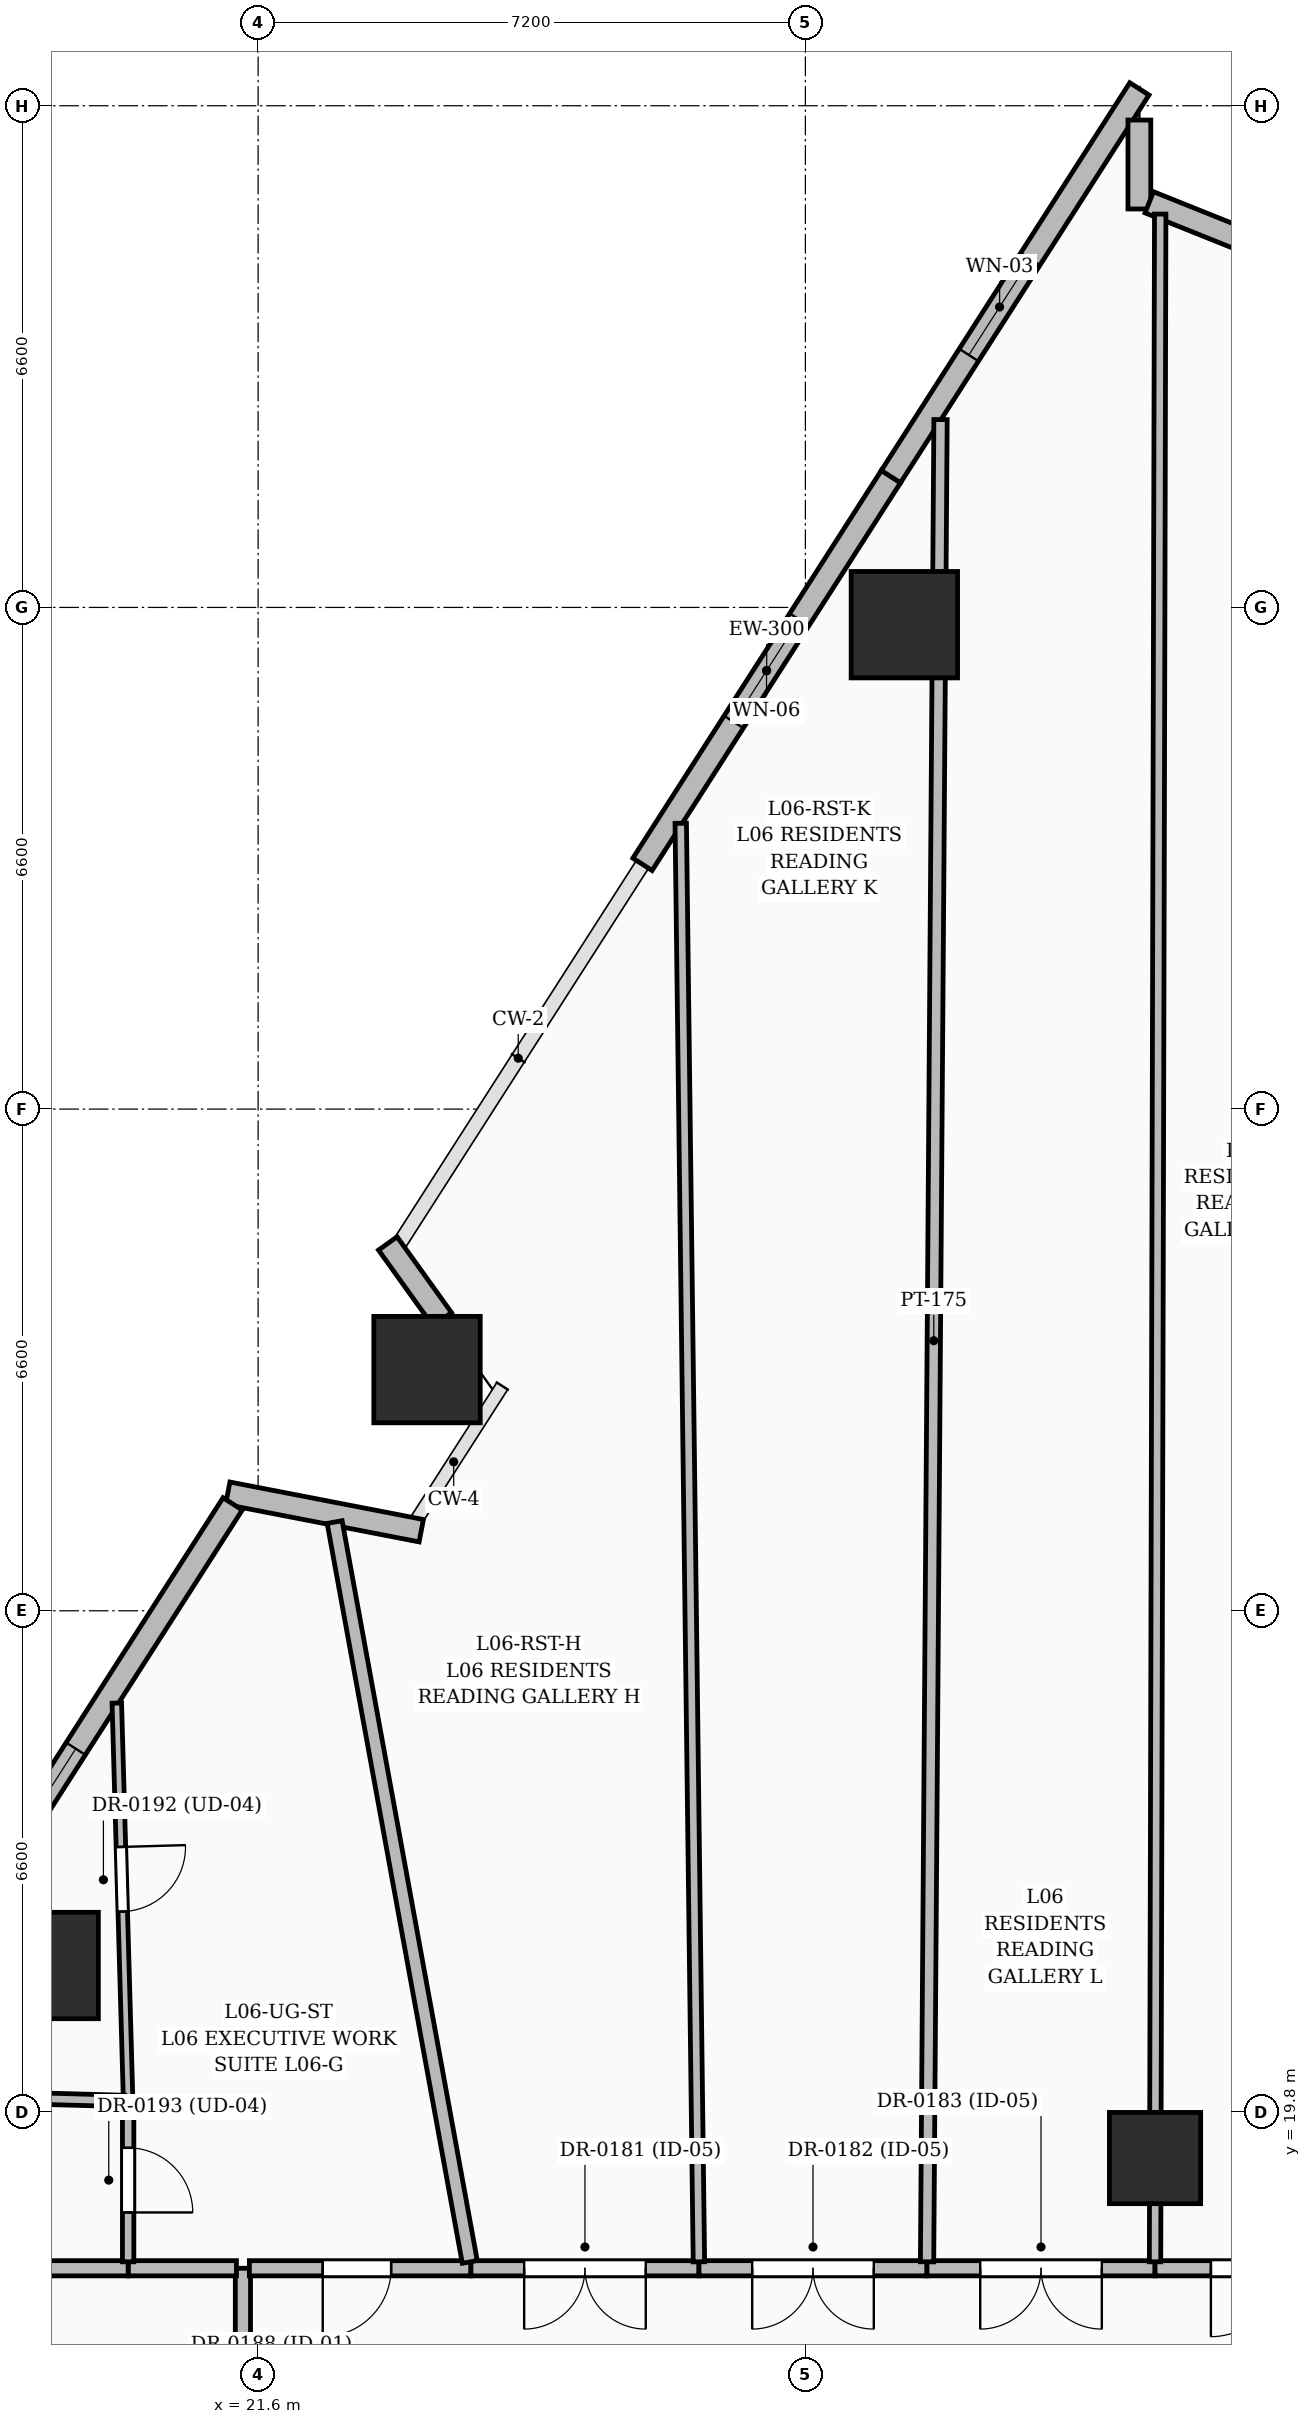
"""IFC4 building model, lengths in metres.
Left out: names, types, materials, properties, quantities, classifications, styles, units other than length and angle.
Written with IfcOpenShell. Run it as: python <this file> out.ifc"""

import sys

from ifc_helpers import new_model, si_unit, direction, frame, frame_2d, origin, origin_2d, place, context, subcontext, project, spatial, rectangle, extrude, element, fill, save


model = new_model("IFC4")
c1 = context("Model", 3, precision=1e-05, world=origin(), true_north=direction((0.0, 1.0)))
c2 = subcontext(c1, "Body", "Model", "MODEL_VIEW")
j1 = project(units=[si_unit("LENGTHUNIT", "METRE"), si_unit("PLANEANGLEUNIT", "RADIAN")], contexts=[c1])
p1 = place(None, origin())
s1 = spatial("IfcSite", under=j1, at=p1, CompositionType="ELEMENT")
p2 = place(p1, origin())
s2 = spatial("IfcBuilding", under=s1, at=p2, CompositionType="ELEMENT")
p3 = place(p2, frame((0.0, 0.0, 31.8)))
s3 = spatial("IfcBuildingStorey", under=s2, at=p3, CompositionType="ELEMENT", Elevation=31.8)
p4 = place(p3, frame((33.4, 19.2, 0.0), z_axis=(0.0, 0.0, 1.0), x_axis=(1.0, 0.0, 0.0)))
e1 = element("IfcColumn", 1, at=p4, inside=s3, PredefinedType="COLUMN", context=c2, shape_type="SweptSolid", body=[
    extrude(rectangle(XDim=1.2, YDim=1.2, at=origin_2d()), origin(), (0.0, 0.0, 1.0), 3.6),
])
for number, where, z_axis, x_axis in (
    (2, (30.102, 39.373, 0.0), (0.0, 0.0, 1.0), (1.0, 0.0, 0.0)),
    (3, (23.822, 29.573, 0.0), (0.0, 0.0, 1.0), (1.0, 0.0, 0.0)),
    (4, (18.798, 21.733, 0.0), (0.0, 0.0, 1.0), (1.0, 0.0, 0.0)),
):
    element("IfcColumn", number, at=place(p3, frame(where, z_axis=z_axis, x_axis=x_axis)), inside=s3, PredefinedType="COLUMN", context=c2, shape_type="SweptSolid", body=[
        extrude(rectangle(XDim=1.4, YDim=1.4, at=origin_2d()), origin(), (0.0, 0.0, 1.0), 3.6),
    ])
p5 = place(p3, frame((21.201, 27.947, 0.0), z_axis=(0.0, 0.0, 1.0), x_axis=(0.981746971615, -0.190191702567, 0.0)))
e5 = element("IfcWall", 5, at=p5, inside=s3, PredefinedType="SOLIDWALL", context=c2, shape_type="SweptSolid", body=[
    extrude(rectangle(XDim=2.593, YDim=0.3, at=frame_2d((1.296, 0.0))), origin(), (0.0, 0.0, 1.0), 2.375),
])
p6 = place(p3, frame((24.022, 30.235, 0.0), z_axis=(0.0, 0.0, 1.0), x_axis=(-0.583004903736, 0.812468634607, 0.0)))
e6 = element("IfcWall", 6, at=p6, inside=s3, PredefinedType="SOLIDWALL", context=c2, shape_type="SweptSolid", body=[
    extrude(rectangle(XDim=1.228, YDim=0.3, at=frame_2d((0.614, 0.0))), origin(), (0.0, 0.0, 1.0), 2.375),
])
p7 = place(p3, frame((26.657, 36.22, 0.0), z_axis=(0.0, 0.0, 1.0), x_axis=(0.539506453767, 0.841981464371, 0.0)))
e7 = element("IfcWall", 7, at=p7, inside=s3, PredefinedType="SOLIDWALL", context=c2, shape_type="SweptSolid", body=[
    extrude(rectangle(XDim=6.058, YDim=0.3, at=frame_2d((3.029, 0.0))), origin(), (0.0, 0.0, 1.0), 3.35),
])
p8 = place(p7, frame((2.225, 0.0, 0.55)))
e8 = element("IfcOpeningElement", 8, at=p8, cuts=e7, PredefinedType="OPENING", context=c2, shape_type="SweptSolid", body=[
    extrude(rectangle(XDim=1.6, YDim=2.2, at=frame_2d((0.8, 1.1))), frame((0.0, 0.16, 0.0), z_axis=(0.0, -1.0, 0.0), x_axis=(1.0, 0.0, 0.0)), (0.0, 0.0, 1.0), 0.32),
])
p9 = place(p3, frame((29.925, 41.321, 0.0), z_axis=(0.0, 0.0, 1.0), x_axis=(0.53953502124, 0.841963158847, 0.0)))
e9 = element("IfcWall", 9, at=p9, inside=s3, PredefinedType="SOLIDWALL", context=c2, shape_type="SweptSolid", body=[
    extrude(rectangle(XDim=6.059, YDim=0.3, at=frame_2d((3.029, 0.0))), origin(), (0.0, 0.0, 1.0), 3.35),
])
p10 = place(p9, frame((1.9, 0.0, 0.6)))
e10 = element("IfcOpeningElement", 10, at=p10, cuts=e9, PredefinedType="OPENING", context=c2, shape_type="SweptSolid", body=[
    extrude(rectangle(XDim=1.5, YDim=2.1, at=frame_2d((0.75, 1.05))), frame((0.0, 0.16, 0.0), z_axis=(0.0, -1.0, 0.0), x_axis=(1.0, 0.0, 0.0)), (0.0, 0.0, 1.0), 0.32),
])
p11 = place(p3, frame((33.194, 46.012, 0.0), z_axis=(0.0, 0.0, 1.0), x_axis=(0.0, -1.0, 0.0)))
e11 = element("IfcWall", 11, at=p11, inside=s3, PredefinedType="SOLIDWALL", context=c2, shape_type="SweptSolid", body=[
    extrude(rectangle(XDim=1.17, YDim=0.3, at=frame_2d((0.585, 0.0))), origin(), (0.0, 0.0, 1.0), 3.35),
])
p12 = place(p3, frame((33.324, 44.93, 0.0), z_axis=(0.0, 0.0, 1.0), x_axis=(0.928091921944, -0.372351157407, 0.0)))
e12 = element("IfcWall", 12, at=p12, inside=s3, PredefinedType="SOLIDWALL", context=c2, shape_type="SweptSolid", body=[
    extrude(rectangle(XDim=3.023, YDim=0.3, at=frame_2d((1.512, 0.0))), origin(), (0.0, 0.0, 1.0), 3.35),
])
p13 = place(p3, frame((17.893, 22.543, 0.0), z_axis=(0.0, 0.0, 1.0), x_axis=(0.539539053693, 0.841960574813, 0.0)))
e13 = element("IfcWall", 13, at=p13, inside=s3, PredefinedType="SOLIDWALL", context=c2, shape_type="SweptSolid", body=[
    extrude(rectangle(XDim=6.251, YDim=0.3, at=frame_2d((3.125, 0.0))), origin(), (0.0, 0.0, 1.0), 3.35),
])
p14 = place(p13, frame((0.625, 0.0, 0.6)))
e14 = element("IfcOpeningElement", 14, at=p14, cuts=e13, PredefinedType="OPENING", context=c2, shape_type="SweptSolid", body=[
    extrude(rectangle(XDim=1.8, YDim=2.1, at=frame_2d((0.9, 1.05))), frame((0.0, 0.16, 0.0), z_axis=(0.0, -1.0, 0.0), x_axis=(1.0, 0.0, 0.0)), (0.0, 0.0, 1.0), 0.32),
])
p15 = place(p3, frame((21.4, 17.75, 0.0), z_axis=(0.0, 0.0, 1.0), x_axis=(0.0, -1.0, 0.0)))
e15 = element("IfcWall", 15, at=p15, inside=s3, PredefinedType="PARTITIONING", context=c2, shape_type="SweptSolid", body=[
    extrude(rectangle(XDim=4.17, YDim=0.2, at=frame_2d((2.085, 0.0))), origin(), (0.0, 0.0, 1.0), 2.709),
])
p16 = place(p15, frame((1.643, 0.0, 0.0)))
e16 = element("IfcOpeningElement", 16, at=p16, cuts=e15, PredefinedType="OPENING", context=c2, shape_type="SweptSolid", body=[
    extrude(rectangle(XDim=1.0, YDim=2.2, at=frame_2d((0.5, 1.1))), frame((0.0, 0.11, 0.0), z_axis=(0.0, -1.0, 0.0), x_axis=(1.0, 0.0, 0.0)), (0.0, 0.0, 1.0), 0.22),
])
p17 = place(p3, frame((24.4, 17.75, 0.0), z_axis=(0.0, 0.0, 1.0), x_axis=(-1.0, 0.0, 0.0)))
e17 = element("IfcWall", 17, at=p17, inside=s3, PredefinedType="PARTITIONING", context=c2, shape_type="SweptSolid", body=[
    extrude(rectangle(XDim=2.915, YDim=0.2, at=frame_2d((1.458, 0.0))), origin(), (0.0, 0.0, 1.0), 2.228),
])
p18 = place(p17, frame((1.05, 0.0, 0.0)))
e18 = element("IfcOpeningElement", 18, at=p18, cuts=e17, PredefinedType="OPENING", context=c2, shape_type="SweptSolid", body=[
    extrude(rectangle(XDim=0.9, YDim=2.1, at=frame_2d((0.45, 1.05))), frame((0.0, 0.11, 0.0), z_axis=(0.0, -1.0, 0.0), x_axis=(1.0, 0.0, 0.0)), (0.0, 0.0, 1.0), 0.22),
])
p19 = place(p3, frame((27.4, 17.75, 0.0), z_axis=(0.0, 0.0, 1.0), x_axis=(-1.0, 0.0, 0.0)))
e19 = element("IfcWall", 19, at=p19, inside=s3, PredefinedType="PARTITIONING", context=c2, shape_type="SweptSolid", body=[
    extrude(rectangle(XDim=3.0, YDim=0.2, at=frame_2d((1.5, 0.0))), origin(), (0.0, 0.0, 1.0), 2.709),
])
p20 = place(p19, frame((0.7, 0.0, 0.0)))
e20 = element("IfcOpeningElement", 20, at=p20, cuts=e19, PredefinedType="OPENING", context=c2, shape_type="SweptSolid", body=[
    extrude(rectangle(XDim=1.6, YDim=2.3, at=frame_2d((0.8, 1.15))), frame((0.0, 0.11, 0.0), z_axis=(0.0, -1.0, 0.0), x_axis=(1.0, 0.0, 0.0)), (0.0, 0.0, 1.0), 0.22),
])
p21 = place(p3, frame((30.4, 17.75, 0.0), z_axis=(0.0, 0.0, 1.0), x_axis=(-1.0, 0.0, 0.0)))
e21 = element("IfcWall", 21, at=p21, inside=s3, PredefinedType="PARTITIONING", context=c2, shape_type="SweptSolid", body=[
    extrude(rectangle(XDim=3.0, YDim=0.2, at=frame_2d((1.5, 0.0))), origin(), (0.0, 0.0, 1.0), 3.35),
])
p22 = place(p21, frame((0.7, 0.0, 0.0)))
e22 = element("IfcOpeningElement", 22, at=p22, cuts=e21, PredefinedType="OPENING", context=c2, shape_type="SweptSolid", body=[
    extrude(rectangle(XDim=1.6, YDim=2.3, at=frame_2d((0.8, 1.15))), frame((0.0, 0.11, 0.0), z_axis=(0.0, -1.0, 0.0), x_axis=(1.0, 0.0, 0.0)), (0.0, 0.0, 1.0), 0.22),
])
p23 = place(p3, frame((33.4, 17.75, 0.0), z_axis=(0.0, 0.0, 1.0), x_axis=(-1.0, 0.0, 0.0)))
e23 = element("IfcWall", 23, at=p23, inside=s3, PredefinedType="PARTITIONING", context=c2, shape_type="SweptSolid", body=[
    extrude(rectangle(XDim=3.0, YDim=0.2, at=frame_2d((1.5, 0.0))), origin(), (0.0, 0.0, 1.0), 3.35),
])
p24 = place(p23, frame((0.7, 0.0, 0.0)))
e24 = element("IfcOpeningElement", 24, at=p24, cuts=e23, PredefinedType="OPENING", context=c2, shape_type="SweptSolid", body=[
    extrude(rectangle(XDim=1.6, YDim=2.3, at=frame_2d((0.8, 1.15))), frame((0.0, 0.11, 0.0), z_axis=(0.0, -1.0, 0.0), x_axis=(1.0, 0.0, 0.0)), (0.0, 0.0, 1.0), 0.22),
])
p25 = place(p3, frame((35.77, 17.75, 0.0), z_axis=(0.0, 0.0, 1.0), x_axis=(-1.0, 0.0, 0.0)))
e25 = element("IfcWall", 25, at=p25, inside=s3, PredefinedType="PARTITIONING", context=c2, shape_type="SweptSolid", body=[
    extrude(rectangle(XDim=2.37, YDim=0.2, at=frame_2d((1.185, 0.0))), origin(), (0.0, 0.0, 1.0), 2.309),
])
p26 = place(p25, frame((0.735, 0.0, 0.0)))
e26 = element("IfcOpeningElement", 26, at=p26, cuts=e25, PredefinedType="OPENING", context=c2, shape_type="SweptSolid", body=[
    extrude(rectangle(XDim=0.9, YDim=2.1, at=frame_2d((0.45, 1.05))), frame((0.0, 0.11, 0.0), z_axis=(0.0, -1.0, 0.0), x_axis=(1.0, 0.0, 0.0)), (0.0, 0.0, 1.0), 0.22),
])
p27 = place(p3, frame((21.315, 17.75, 0.0), z_axis=(0.0, 0.0, 1.0), x_axis=(-1.0, 0.0, 0.0)))
e27 = element("IfcWall", 27, at=p27, inside=s3, PredefinedType="PARTITIONING", context=c2, shape_type="SweptSolid", body=[
    extrude(rectangle(XDim=1.425, YDim=0.2, at=frame_2d((0.712, 0.0))), origin(), (0.0, 0.0, 1.0), 2.709),
])
p28 = place(p3, frame((19.89, 17.75, 0.0), z_axis=(0.0, 0.0, 1.0), x_axis=(-1.0, 0.0, 0.0)))
e28 = element("IfcWall", 28, at=p28, inside=s3, PredefinedType="PARTITIONING", context=c2, shape_type="SweptSolid", body=[
    extrude(rectangle(XDim=3.202, YDim=0.2, at=frame_2d((1.601, 0.0))), origin(), (0.0, 0.0, 1.0), 3.35),
])
p29 = place(p3, frame((19.741, 25.186, 0.0), z_axis=(0.0, 0.0, 1.0), x_axis=(0.028430709053, -0.999595765689, 0.0)))
e29 = element("IfcWall", 29, at=p29, inside=s3, PredefinedType="PARTITIONING", context=c2, shape_type="SweptSolid", body=[
    extrude(rectangle(XDim=5.238, YDim=0.125, at=frame_2d((2.619, 0.0))), origin(), (0.0, 0.0, 1.0), 2.228),
])
p30 = place(p29, frame((1.894, 0.0, 0.0)))
e30 = element("IfcOpeningElement", 30, at=p30, cuts=e29, PredefinedType="OPENING", context=c2, shape_type="SweptSolid", body=[
    extrude(rectangle(XDim=0.85, YDim=2.1, at=frame_2d((0.425, 1.05))), frame((0.0, 0.072, 0.0), z_axis=(0.0, -1.0, 0.0), x_axis=(1.0, 0.0, 0.0)), (0.0, 0.0, 1.0), 0.145),
])
p31 = place(p3, frame((19.89, 19.95, 0.0), z_axis=(0.0, 0.0, 1.0), x_axis=(0.0, -1.0, 0.0)))
e31 = element("IfcWall", 31, at=p31, inside=s3, PredefinedType="PARTITIONING", context=c2, shape_type="SweptSolid", body=[
    extrude(rectangle(XDim=2.115, YDim=0.15, at=frame_2d((1.058, 0.0))), origin(), (0.0, 0.0, 1.0), 3.35),
])
p32 = place(p31, frame((0.615, 0.0, 0.0)))
e32 = element("IfcOpeningElement", 32, at=p32, cuts=e31, PredefinedType="OPENING", context=c2, shape_type="SweptSolid", body=[
    extrude(rectangle(XDim=0.85, YDim=2.1, at=frame_2d((0.425, 1.05))), frame((0.0, 0.085, 0.0), z_axis=(0.0, -1.0, 0.0), x_axis=(1.0, 0.0, 0.0)), (0.0, 0.0, 1.0), 0.17),
])
p33 = place(p3, frame((24.385, 17.833, 0.0), z_axis=(0.0, 0.0, 1.0), x_axis=(-0.179680097859, 0.98372509495, 0.0)))
e33 = element("IfcWall", 33, at=p33, inside=s3, PredefinedType="PARTITIONING", context=c2, shape_type="SweptSolid", body=[
    extrude(rectangle(XDim=9.895, YDim=0.2, at=frame_2d((4.947, 0.0))), origin(), (0.0, 0.0, 1.0), 2.37),
])
p34 = place(p3, frame((16.433, 20.046, 0.0), z_axis=(0.0, 0.0, 1.0), x_axis=(0.999614255068, -0.027773027638, 0.0)))
e34 = element("IfcWall", 34, at=p34, inside=s3, PredefinedType="PARTITIONING", context=c2, shape_type="SweptSolid", body=[
    extrude(rectangle(XDim=3.411, YDim=0.15, at=frame_2d((1.705, 0.0))), origin(), (0.0, 0.0, 1.0), 2.37),
])
p35 = place(p3, frame((27.399, 17.835, 0.0), z_axis=(0.0, 0.0, 1.0), x_axis=(-0.012641377926, 0.99992009459, 0.0)))
e35 = element("IfcWall", 35, at=p35, inside=s3, PredefinedType="PARTITIONING", context=c2, shape_type="SweptSolid", body=[
    extrude(rectangle(XDim=18.927, YDim=0.15, at=frame_2d((9.463, 0.0))), origin(), (0.0, 0.0, 1.0), 2.228),
])
p36 = place(p3, frame((30.401, 17.835, 0.0), z_axis=(0.0, 0.0, 1.0), x_axis=(0.007313118493, 0.999973258791, 0.0)))
e36 = element("IfcWall", 36, at=p36, inside=s3, PredefinedType="PARTITIONING", context=c2, shape_type="SweptSolid", body=[
    extrude(rectangle(XDim=24.237, YDim=0.175, at=frame_2d((12.118, 0.0))), origin(), (0.0, 0.0, 1.0), 2.228),
])
p37 = place(p3, frame((33.4, 17.835, 0.0), z_axis=(0.0, 0.0, 1.0), x_axis=(0.002519340237, 0.999996826457, 0.0)))
e37 = element("IfcWall", 37, at=p37, inside=s3, PredefinedType="PARTITIONING", context=c2, shape_type="SweptSolid", body=[
    extrude(rectangle(XDim=26.94, YDim=0.15, at=frame_2d((13.47, 0.0))), origin(), (0.0, 0.0, 1.0), 2.228),
])
p38 = place(p8, origin())
e38 = element("IfcWindow", 38, at=p38, inside=s3, PartitioningType="SINGLE_PANEL", PredefinedType="WINDOW", context=c2, shape_type="SweptSolid", body=[
    extrude(rectangle(XDim=1.6, YDim=2.2, at=frame_2d((0.8, 1.1))), frame((0.0, 0.03, 0.0), z_axis=(0.0, -1.0, 0.0), x_axis=(1.0, 0.0, 0.0)), (0.0, 0.0, 1.0), 0.06),
])
fill(e8, e38)
p39 = place(p10, origin())
e39 = element("IfcWindow", 39, at=p39, inside=s3, PartitioningType="SINGLE_PANEL", PredefinedType="WINDOW", context=c2, shape_type="SweptSolid", body=[
    extrude(rectangle(XDim=1.5, YDim=2.1, at=frame_2d((0.75, 1.05))), frame((0.0, 0.03, 0.0), z_axis=(0.0, -1.0, 0.0), x_axis=(1.0, 0.0, 0.0)), (0.0, 0.0, 1.0), 0.06),
])
fill(e10, e39)
p40 = place(p14, origin())
e40 = element("IfcWindow", 40, at=p40, inside=s3, PartitioningType="SINGLE_PANEL", PredefinedType="WINDOW", context=c2, shape_type="SweptSolid", body=[
    extrude(rectangle(XDim=1.8, YDim=2.1, at=frame_2d((0.9, 1.05))), frame((0.0, 0.03, 0.0), z_axis=(0.0, -1.0, 0.0), x_axis=(1.0, 0.0, 0.0)), (0.0, 0.0, 1.0), 0.06),
])
fill(e14, e40)
p41 = place(p20, origin())
e41 = element("IfcDoor", 41, at=p41, inside=s3, OperationType="DOUBLE_DOOR_SINGLE_SWING", PredefinedType="DOOR", context=c2, shape_type="SweptSolid", body=[
    extrude(rectangle(XDim=1.6, YDim=2.3, at=frame_2d((0.8, 1.15))), frame((0.0, 0.025, 0.0), z_axis=(0.0, -1.0, 0.0), x_axis=(1.0, 0.0, 0.0)), (0.0, 0.0, 1.0), 0.05),
])
fill(e20, e41)
p42 = place(p22, origin())
e42 = element("IfcDoor", 42, at=p42, inside=s3, OperationType="DOUBLE_DOOR_SINGLE_SWING", PredefinedType="DOOR", context=c2, shape_type="SweptSolid", body=[
    extrude(rectangle(XDim=1.6, YDim=2.3, at=frame_2d((0.8, 1.15))), frame((0.0, 0.025, 0.0), z_axis=(0.0, -1.0, 0.0), x_axis=(1.0, 0.0, 0.0)), (0.0, 0.0, 1.0), 0.05),
])
fill(e22, e42)
p43 = place(p24, origin())
e43 = element("IfcDoor", 43, at=p43, inside=s3, OperationType="DOUBLE_DOOR_SINGLE_SWING", PredefinedType="DOOR", context=c2, shape_type="SweptSolid", body=[
    extrude(rectangle(XDim=1.6, YDim=2.3, at=frame_2d((0.8, 1.15))), frame((0.0, 0.025, 0.0), z_axis=(0.0, -1.0, 0.0), x_axis=(1.0, 0.0, 0.0)), (0.0, 0.0, 1.0), 0.05),
])
fill(e24, e43)
p44 = place(p26, origin())
e44 = element("IfcDoor", 44, at=p44, inside=s3, OperationType="SINGLE_SWING_RIGHT", PredefinedType="DOOR", context=c2, shape_type="SweptSolid", body=[
    extrude(rectangle(XDim=0.9, YDim=2.1, at=frame_2d((0.45, 1.05))), frame((0.0, 0.025, 0.0), z_axis=(0.0, -1.0, 0.0), x_axis=(1.0, 0.0, 0.0)), (0.0, 0.0, 1.0), 0.05),
])
fill(e26, e44)
p45 = place(p18, origin())
e45 = element("IfcDoor", 45, at=p45, inside=s3, OperationType="SINGLE_SWING_RIGHT", PredefinedType="DOOR", context=c2, shape_type="SweptSolid", body=[
    extrude(rectangle(XDim=0.9, YDim=2.1, at=frame_2d((0.45, 1.05))), frame((0.0, 0.025, 0.0), z_axis=(0.0, -1.0, 0.0), x_axis=(1.0, 0.0, 0.0)), (0.0, 0.0, 1.0), 0.05),
])
fill(e18, e45)
p46 = place(p30, origin())
e46 = element("IfcDoor", 46, at=p46, inside=s3, OperationType="SINGLE_SWING_LEFT", PredefinedType="DOOR", context=c2, shape_type="SweptSolid", body=[
    extrude(rectangle(XDim=0.85, YDim=2.1, at=frame_2d((0.425, 1.05))), frame((0.0, 0.025, 0.0), z_axis=(0.0, -1.0, 0.0), x_axis=(1.0, 0.0, 0.0)), (0.0, 0.0, 1.0), 0.05),
])
fill(e30, e46)
p47 = place(p32, origin())
e47 = element("IfcDoor", 47, at=p47, inside=s3, OperationType="SINGLE_SWING_RIGHT", PredefinedType="DOOR", context=c2, shape_type="SweptSolid", body=[
    extrude(rectangle(XDim=0.85, YDim=2.1, at=frame_2d((0.425, 1.05))), frame((0.0, 0.025, 0.0), z_axis=(0.0, -1.0, 0.0), x_axis=(1.0, 0.0, 0.0)), (0.0, 0.0, 1.0), 0.05),
])
fill(e32, e47)
save(model, sys.argv[1])
